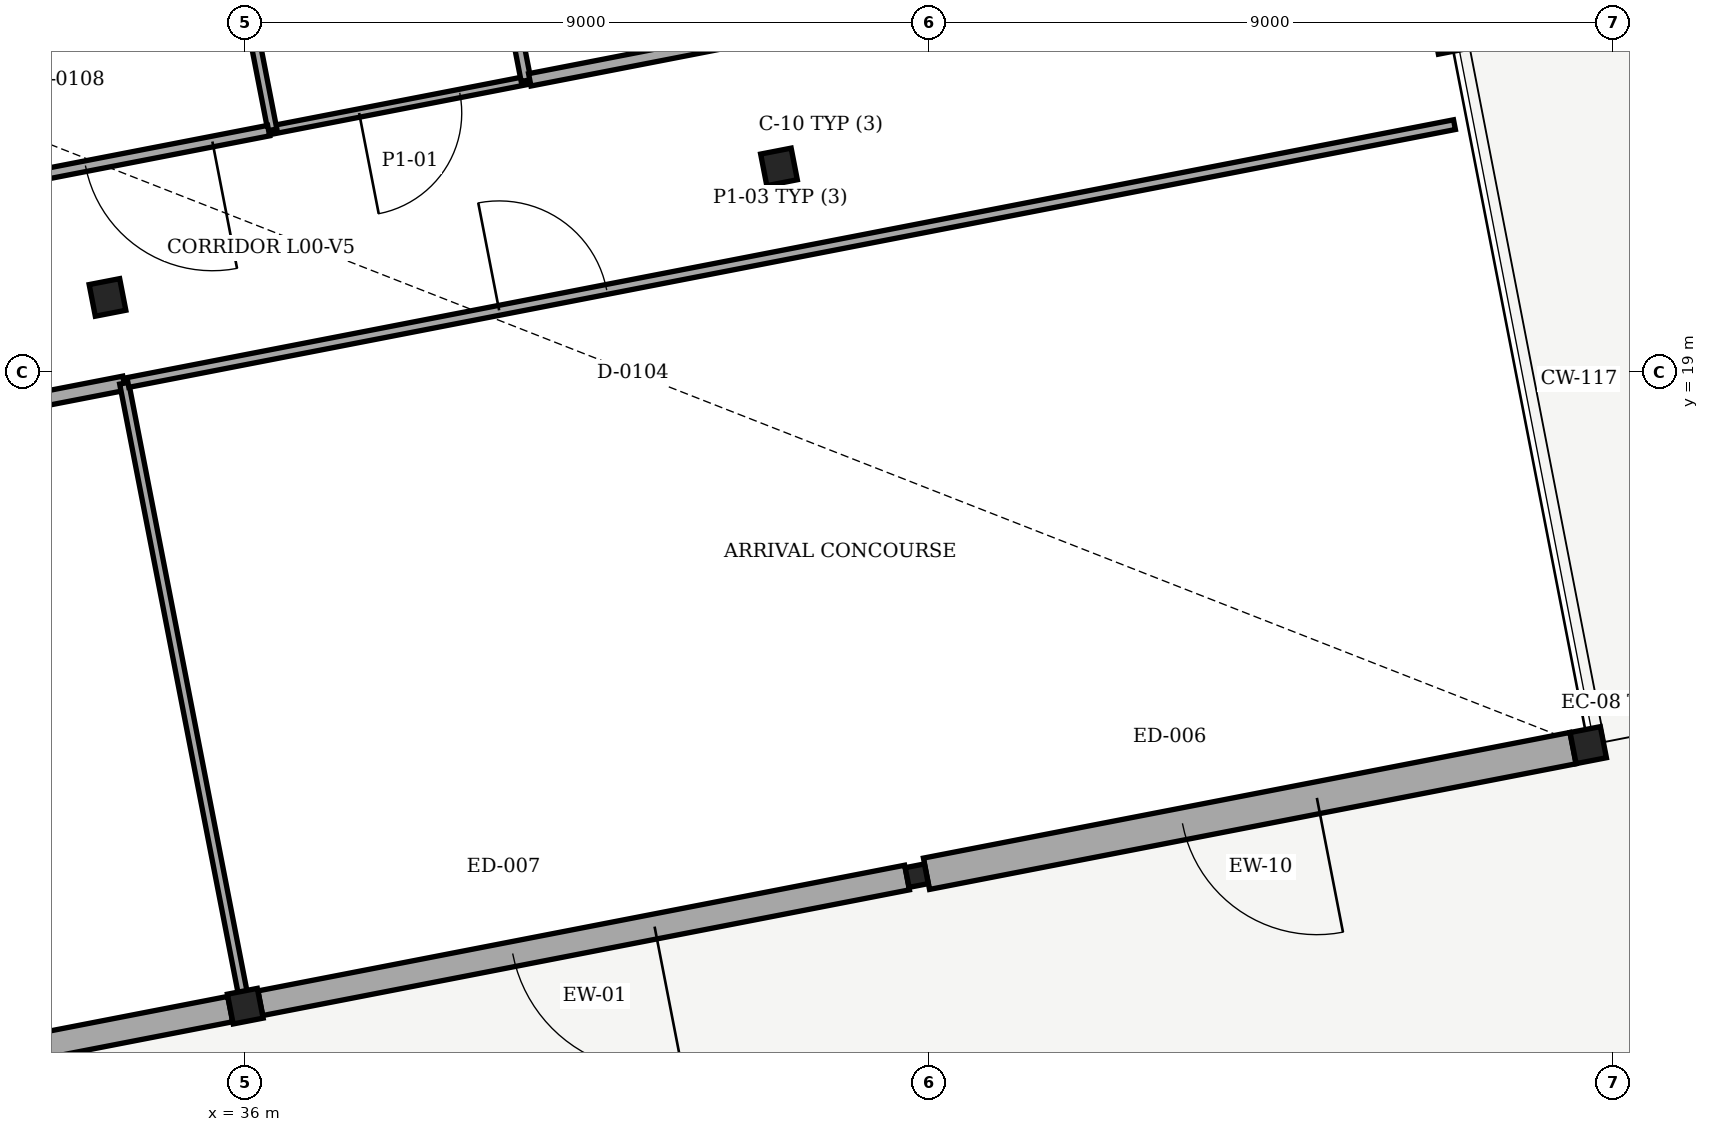
"""IFC4 building model, lengths in metres.
Left out: names, types, materials, properties, quantities, classifications, styles, units other than length and angle.
Written with IfcOpenShell. Run it as: python <this file> out.ifc"""

import sys

from ifc_helpers import new_model, si_unit, direction, frame, frame_2d, origin, origin_with_axes, origin_2d, place, context, subcontext, project, spatial, rectangle, i_section, extrude, element, fill, save


model = new_model("IFC4")
c1 = context("Model", 3, precision=1e-05, world=origin(), true_north=direction((0.0, 1.0)))
c2 = subcontext(c1, "Body", "Model", "MODEL_VIEW")
j1 = project(units=[si_unit("LENGTHUNIT", "METRE"), si_unit("PLANEANGLEUNIT", "RADIAN")], contexts=[c1])
p1 = place(None, origin())
s1 = spatial("IfcSite", under=j1, at=p1, CompositionType="ELEMENT")
p2 = place(p1, origin())
s2 = spatial("IfcBuilding", under=s1, at=p2, CompositionType="ELEMENT")
p3 = place(p2, origin())
s3 = spatial("IfcBuildingStorey", under=s2, at=p3, CompositionType="ELEMENT", Elevation=0.0)
p4 = place(p3, frame((36.004, 10.652, 0.0), z_axis=(0.0, 0.0, 1.0), x_axis=(0.981627183448, 0.190808995377, 0.0)))
e1 = element("IfcColumn", 1, at=p4, inside=s3, PredefinedType="COLUMN", context=c2, shape_type="SweptSolid", body=[
    extrude(i_section(OverallWidth=0.401, OverallDepth=0.399, WebThickness=0.025, FlangeThickness=0.04, FilletRadius=0.015, at=origin_2d()), origin(), (0.0, 0.0, 1.0), 4.8),
])
p5 = place(p3, frame((34.191, 19.977, 0.0), z_axis=(0.0, 0.0, 1.0), x_axis=(0.981627183448, 0.190808995377, 0.0)))
e2 = element("IfcColumn", 2, at=p5, inside=s3, PredefinedType="COLUMN", context=c2, shape_type="SweptSolid", body=[
    extrude(i_section(OverallWidth=0.409, OverallDepth=0.424, WebThickness=0.033, FlangeThickness=0.052, FilletRadius=0.015, at=origin_2d()), origin(), (0.0, 0.0, 1.0), 4.8),
])
p6 = place(p3, frame((44.839, 12.369, 0.0), z_axis=(0.0, 0.0, 1.0), x_axis=(0.981627183448, 0.190808995377, 0.0)))
e3 = element("IfcColumn", 3, at=p6, inside=s3, PredefinedType="PILASTER", context=c2, shape_type="SweptSolid", body=[
    extrude(i_section(OverallWidth=0.257, OverallDepth=0.264, WebThickness=0.012, FlangeThickness=0.02, FilletRadius=0.009, at=origin_2d()), origin(), (0.0, 0.0, 1.0), 4.8),
])
p7 = place(p3, frame((43.026, 21.695, 0.0), z_axis=(0.0, 0.0, 1.0), x_axis=(0.981627183448, 0.190808995377, 0.0)))
e4 = element("IfcColumn", 4, at=p7, inside=s3, PredefinedType="COLUMN", context=c2, shape_type="SweptSolid", body=[
    extrude(i_section(OverallWidth=0.409, OverallDepth=0.424, WebThickness=0.033, FlangeThickness=0.052, FilletRadius=0.015, at=origin_2d()), origin(), (0.0, 0.0, 1.0), 4.8),
])
p8 = place(p3, frame((53.673, 14.086, 0.0), z_axis=(0.0, 0.0, 1.0), x_axis=(0.981627183448, 0.190808995377, 0.0)))
e5 = element("IfcColumn", 5, at=p8, inside=s3, PredefinedType="COLUMN", context=c2, shape_type="SweptSolid", body=[
    extrude(i_section(OverallWidth=0.406, OverallDepth=0.417, WebThickness=0.03, FlangeThickness=0.048, FilletRadius=0.015, at=origin_2d()), origin(), (0.0, 0.0, 1.0), 4.8),
])
p9 = place(p3, frame((51.861, 23.412, 0.0), z_axis=(0.0, 0.0, 1.0), x_axis=(0.981627183448, 0.190808995377, 0.0)))
e6 = element("IfcColumn", 6, at=p9, inside=s3, PredefinedType="COLUMN", context=c2, shape_type="SweptSolid", body=[
    extrude(i_section(OverallWidth=0.401, OverallDepth=0.399, WebThickness=0.025, FlangeThickness=0.04, FilletRadius=0.015, at=origin_2d()), origin(), (0.0, 0.0, 1.0), 4.8),
])
p10 = place(p3, frame((53.472, 14.047, 0.0), z_axis=(0.0, 0.0, 1.0), x_axis=(-0.981625213887, -0.190819127607, 0.0)))
e7 = element("IfcWall", 7, at=p10, inside=s3, PredefinedType="SOLIDWALL", context=c2, shape_type="SweptSolid", body=[
    extrude(rectangle(XDim=8.664, YDim=0.42, at=frame_2d((4.332, 0.0))), origin(), (0.0, 0.0, 1.0), 3.4),
])
p11 = place(p10, frame((3.432, 0.0, 0.0)))
e8 = element("IfcOpeningElement", 8, at=p11, cuts=e7, PredefinedType="OPENING", context=c2, shape_type="SweptSolid", body=[
    extrude(rectangle(XDim=1.8, YDim=2.2, at=frame_2d((0.9, 1.1))), frame((0.0, 0.22, 0.0), z_axis=(0.0, -1.0, 0.0), x_axis=(1.0, 0.0, 0.0)), (0.0, 0.0, 1.0), 0.44),
])
p12 = place(p3, frame((44.71, 12.344, 0.0), z_axis=(0.0, 0.0, 1.0), x_axis=(-0.98162594361, -0.19081537368, 0.0)))
e9 = element("IfcWall", 9, at=p12, inside=s3, PredefinedType="SOLIDWALL", context=c2, shape_type="SweptSolid", body=[
    extrude(rectangle(XDim=8.667, YDim=0.33, at=frame_2d((4.333, 0.0))), origin(), (0.0, 0.0, 1.0), 3.4),
])
p13 = place(p12, frame((3.384, 0.0, 0.0)))
e10 = element("IfcOpeningElement", 10, at=p13, cuts=e9, PredefinedType="OPENING", context=c2, shape_type="SweptSolid", body=[
    extrude(rectangle(XDim=1.9, YDim=2.2, at=frame_2d((0.95, 1.1))), frame((0.0, 0.175, 0.0), z_axis=(0.0, -1.0, 0.0), x_axis=(1.0, 0.0, 0.0)), (0.0, 0.0, 1.0), 0.35),
])
p14 = place(p3, frame((35.805, 10.613, 0.0), z_axis=(0.0, 0.0, 1.0), x_axis=(-0.981624261177, -0.190824028542, 0.0)))
e11 = element("IfcWall", 11, at=p14, inside=s3, PredefinedType="SOLIDWALL", context=c2, shape_type="SweptSolid", body=[
    extrude(rectangle(XDim=8.593, YDim=0.34, at=frame_2d((4.296, 0.0))), origin(), (0.0, 0.0, 1.0), 3.4),
])
p15 = place(p14, frame((3.296, 0.0, 0.0)))
e12 = element("IfcOpeningElement", 12, at=p15, cuts=e11, PredefinedType="OPENING", context=c2, shape_type="SweptSolid", body=[
    extrude(rectangle(XDim=2.0, YDim=2.25, at=frame_2d((1.0, 1.125))), frame((0.0, 0.18, 0.0), z_axis=(0.0, -1.0, 0.0), x_axis=(1.0, 0.0, 0.0)), (0.0, 0.0, 1.0), 0.36),
])
p16 = place(p3, frame((16.741, 15.414, 0.0), z_axis=(0.0, 0.0, 1.0), x_axis=(0.98162689412, 0.190810483833, 0.0)))
e13 = element("IfcWall", 13, at=p16, inside=s3, PredefinedType="PARTITIONING", context=c2, shape_type="SweptSolid", body=[
    extrude(rectangle(XDim=18.0, YDim=0.19, at=frame_2d((9.0, 0.0))), origin(), (0.0, 0.0, 1.0), 3.38),
])
p17 = place(p16, frame((10.196, 0.0, 0.0)))
e14 = element("IfcOpeningElement", 14, at=p17, cuts=e13, PredefinedType="OPENING", context=c2, shape_type="SweptSolid", body=[
    extrude(rectangle(XDim=1.38, YDim=2.22, at=frame_2d((0.69, 1.11))), frame((0.0, 0.105, 0.0), z_axis=(0.0, -1.0, 0.0), x_axis=(1.0, 0.0, 0.0)), (0.0, 0.0, 1.0), 0.21),
])
p18 = place(p3, frame((34.411, 18.848, 0.0), z_axis=(0.0, 0.0, 1.0), x_axis=(0.190804153264, -0.981628124647, 0.0)))
e15 = element("IfcWall", 15, at=p18, inside=s3, PredefinedType="PARTITIONING", context=c2, shape_type="SweptSolid", body=[
    extrude(rectangle(XDim=8.18, YDim=0.12, at=frame_2d((4.09, 0.0))), origin(), (0.0, 0.0, 1.0), 3.38),
])
p19 = place(p3, frame((34.46, 18.858, 0.0), z_axis=(0.0, 0.0, 1.0), x_axis=(0.981627322124, 0.190808281949, 0.0)))
e16 = element("IfcWall", 16, at=p19, inside=s3, PredefinedType="PARTITIONING", context=c2, shape_type="SweptSolid", body=[
    extrude(rectangle(XDim=17.78, YDim=0.13, at=frame_2d((8.89, 0.0))), origin(), (0.0, 0.0, 1.0), 3.38),
])
p20 = place(p19, frame((4.976, 0.0, 0.0)))
e17 = element("IfcOpeningElement", 17, at=p20, cuts=e16, PredefinedType="OPENING", context=c2, shape_type="SweptSolid", body=[
    extrude(rectangle(XDim=1.44, YDim=2.22, at=frame_2d((0.72, 1.11))), frame((0.0, 0.075, 0.0), z_axis=(0.0, -1.0, 0.0), x_axis=(1.0, 0.0, 0.0)), (0.0, 0.0, 1.0), 0.15),
])
p21 = place(p3, frame((39.698, 22.831, 0.0), z_axis=(0.0, 0.0, 1.0), x_axis=(-0.981616137106, -0.190865815101, 0.0)))
e18 = element("IfcWall", 18, at=p21, inside=s3, PredefinedType="PARTITIONING", context=c2, shape_type="SweptSolid", body=[
    extrude(rectangle(XDim=3.4, YDim=0.11, at=frame_2d((1.7, 0.0))), origin(), (0.0, 0.0, 1.0), 3.38),
])
p22 = place(p21, frame((0.887, 0.0, 0.0)))
e19 = element("IfcOpeningElement", 19, at=p22, cuts=e18, PredefinedType="OPENING", context=c2, shape_type="SweptSolid", body=[
    extrude(rectangle(XDim=1.35, YDim=2.2, at=frame_2d((0.675, 1.1))), frame((0.0, 0.065, 0.0), z_axis=(0.0, -1.0, 0.0), x_axis=(1.0, 0.0, 0.0)), (0.0, 0.0, 1.0), 0.13),
])
p23 = place(p3, frame((36.361, 22.182, 0.0), z_axis=(0.0, 0.0, 1.0), x_axis=(-0.190832757405, 0.981622564279, 0.0)))
e20 = element("IfcWall", 20, at=p23, inside=s3, PredefinedType="PARTITIONING", context=c2, shape_type="SweptSolid", body=[
    extrude(rectangle(XDim=4.25, YDim=0.12, at=frame_2d((2.125, 0.0))), origin(), (0.0, 0.0, 1.0), 3.38),
])
p24 = place(p3, frame((38.887, 27.002, 0.0), z_axis=(0.0, 0.0, 1.0), x_axis=(0.190832757405, -0.981622564279, 0.0)))
e21 = element("IfcWall", 21, at=p24, inside=s3, PredefinedType="PARTITIONING", context=c2, shape_type="SweptSolid", body=[
    extrude(rectangle(XDim=4.25, YDim=0.13, at=frame_2d((2.125, 0.0))), origin(), (0.0, 0.0, 1.0), 3.38),
])
p25 = place(p3, frame((36.311, 22.172, 0.0), z_axis=(0.0, 0.0, 1.0), x_axis=(-0.981629588591, -0.190796621572, 0.0)))
e22 = element("IfcWall", 22, at=p25, inside=s3, PredefinedType="PARTITIONING", context=c2, shape_type="SweptSolid", body=[
    extrude(rectangle(XDim=3.4, YDim=0.14, at=frame_2d((1.7, 0.0))), origin(), (0.0, 0.0, 1.0), 3.38),
])
p26 = place(p25, frame((0.754, 0.0, 0.0)))
e23 = element("IfcOpeningElement", 23, at=p26, cuts=e22, PredefinedType="OPENING", context=c2, shape_type="SweptSolid", body=[
    extrude(rectangle(XDim=1.7, YDim=2.2, at=frame_2d((0.85, 1.1))), frame((0.0, 0.08, 0.0), z_axis=(0.0, -1.0, 0.0), x_axis=(1.0, 0.0, 0.0)), (0.0, 0.0, 1.0), 0.16),
])
p27 = place(p3, frame((42.545, 23.384, 0.0), z_axis=(0.0, 0.0, 1.0), x_axis=(-0.981633664584, -0.190775649797, 0.0)))
e24 = element("IfcWall", 24, at=p27, inside=s3, PredefinedType="PARTITIONING", context=c2, shape_type="SweptSolid", body=[
    extrude(rectangle(XDim=2.85, YDim=0.165, at=frame_2d((1.425, 0.0))), origin(), (0.0, 0.0, 1.0), 3.38),
])
p28 = place(p11, origin_with_axes())
e25 = element("IfcDoor", 25, at=p28, inside=s3, OperationType="DOUBLE_DOOR_SINGLE_SWING", PredefinedType="DOOR", context=c2, shape_type="SweptSolid", body=[
    extrude(rectangle(XDim=1.8, YDim=2.2, at=frame_2d((0.9, 1.1))), frame((0.0, 0.025, 0.0), z_axis=(0.0, -1.0, 0.0), x_axis=(1.0, 0.0, 0.0)), (0.0, 0.0, 1.0), 0.05),
])
fill(e8, e25)
p29 = place(p13, origin_with_axes())
e26 = element("IfcDoor", 26, at=p29, inside=s3, OperationType="DOUBLE_DOOR_SINGLE_SWING", PredefinedType="DOOR", context=c2, shape_type="SweptSolid", body=[
    extrude(rectangle(XDim=1.9, YDim=2.2, at=frame_2d((0.95, 1.1))), frame((0.0, 0.025, 0.0), z_axis=(0.0, -1.0, 0.0), x_axis=(1.0, 0.0, 0.0)), (0.0, 0.0, 1.0), 0.05),
])
fill(e10, e26)
p30 = place(p20, origin_with_axes())
e27 = element("IfcDoor", 27, at=p30, inside=s3, OperationType="SINGLE_SWING_LEFT", PredefinedType="DOOR", context=c2, shape_type="SweptSolid", body=[
    extrude(rectangle(XDim=1.44, YDim=2.22, at=frame_2d((0.72, 1.11))), frame((0.0, 0.025, 0.0), z_axis=(0.0, -1.0, 0.0), x_axis=(1.0, 0.0, 0.0)), (0.0, 0.0, 1.0), 0.05),
])
fill(e17, e27)
p31 = place(p22, origin_with_axes())
e28 = element("IfcDoor", 28, at=p31, inside=s3, OperationType="SINGLE_SWING_RIGHT", PredefinedType="DOOR", context=c2, shape_type="SweptSolid", body=[
    extrude(rectangle(XDim=1.35, YDim=2.2, at=frame_2d((0.675, 1.1))), frame((0.0, 0.025, 0.0), z_axis=(0.0, -1.0, 0.0), x_axis=(1.0, 0.0, 0.0)), (0.0, 0.0, 1.0), 0.05),
])
fill(e19, e28)
p32 = place(p26, origin_with_axes())
e29 = element("IfcDoor", 29, at=p32, inside=s3, OperationType="DOUBLE_DOOR_SINGLE_SWING", PredefinedType="DOOR", context=c2, shape_type="SweptSolid", body=[
    extrude(rectangle(XDim=1.7, YDim=2.2, at=frame_2d((0.85, 1.1))), frame((0.0, 0.025, 0.0), z_axis=(0.0, -1.0, 0.0), x_axis=(1.0, 0.0, 0.0)), (0.0, 0.0, 1.0), 0.05),
])
fill(e23, e29)
save(model, sys.argv[1])
